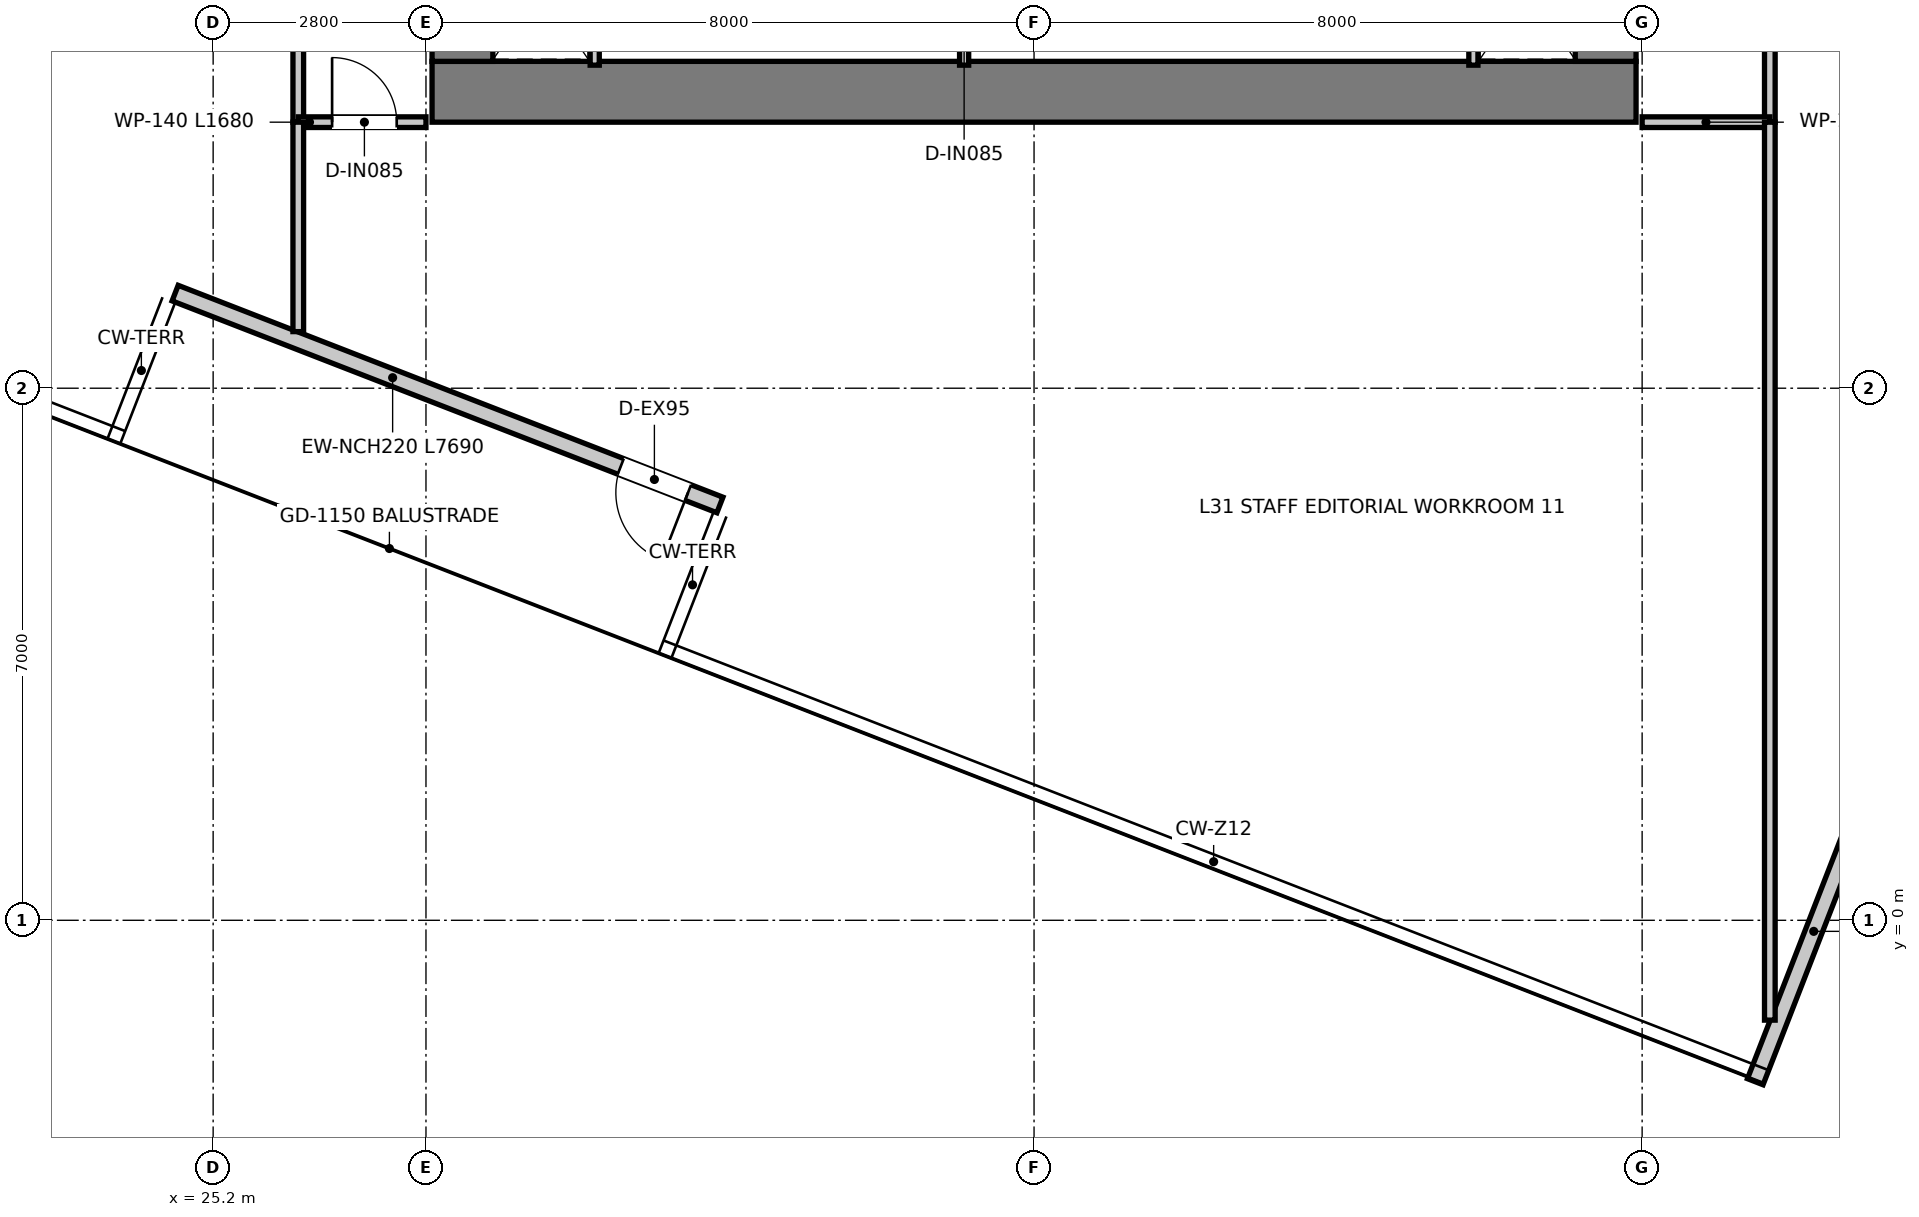
"""IFC4 building model, lengths in metres.
Left out: names, types, materials, properties, quantities, classifications, styles, units other than length and angle.
Written with IfcOpenShell. Run it as: python <this file> out.ifc"""

import sys

from ifc_helpers import new_model, si_unit, direction, frame, frame_2d, origin, place, context, subcontext, project, spatial, rectangle, extrude, element, fill, save


model = new_model("IFC4")
c1 = context("Model", 3, precision=1e-05, world=origin(), true_north=direction((0.0, 1.0)))
c2 = subcontext(c1, "Body", "Model", "MODEL_VIEW")
j1 = project(units=[si_unit("LENGTHUNIT", "METRE"), si_unit("PLANEANGLEUNIT", "RADIAN")], contexts=[c1])
p1 = place(None, origin())
s1 = spatial("IfcSite", under=j1, at=p1, CompositionType="ELEMENT")
p2 = place(p1, origin())
s2 = spatial("IfcBuilding", under=s1, at=p2, CompositionType="ELEMENT")
p3 = place(p2, frame((0.0, 0.0, 129.55)))
s3 = spatial("IfcBuildingStorey", under=s2, at=p3, CompositionType="ELEMENT", Elevation=129.55)
p4 = place(p3, frame((28.08, 10.9, 0.0), z_axis=(0.0, 0.0, 1.0), x_axis=(1.0, 0.0, 0.0)))
e1 = element("IfcWall", 1, at=p4, inside=s3, PredefinedType="SHEAR", context=c2, shape_type="SweptSolid", body=[
    extrude(rectangle(XDim=15.84, YDim=0.8, at=frame_2d((7.92, 0.0))), origin(), (0.0, 0.0, 1.0), 3.95),
])
for number, where, z_axis, x_axis in (
    (2, (28.48, 11.3, 0.0), (0.0, 0.0, 1.0), (0.0, 1.0, 0.0)),
    (3, (43.52, 11.3, 0.0), (0.0, 0.0, 1.0), (0.0, 1.0, 0.0)),
):
    element("IfcWall", number, at=place(p3, frame(where, z_axis=z_axis, x_axis=x_axis)), inside=s3, PredefinedType="SHEAR", context=c2, shape_type="SweptSolid", body=[
        extrude(rectangle(XDim=14.7, YDim=0.8, at=frame_2d((7.35, 0.0))), origin(), (0.0, 0.0, 1.0), 3.95),
    ])
p5 = place(p3, frame((31.867, 5.464, 0.0), z_axis=(0.0, 0.0, 1.0), x_axis=(-0.931996329979, 0.362467710157, 0.0)))
e4 = element("IfcWall", 4, at=p5, inside=s3, PredefinedType="ELEMENTEDWALL", context=c2, shape_type="SweptSolid", body=[
    extrude(rectangle(XDim=7.69, YDim=0.22, at=frame_2d((3.845, 0.0))), origin(), (0.0, 0.0, 1.0), 3.67),
])
p6 = place(p5, frame((0.45, 0.0, 0.0)))
e5 = element("IfcOpeningElement", 5, at=p6, cuts=e4, PredefinedType="OPENING", context=c2, shape_type="SweptSolid", body=[
    extrude(rectangle(XDim=0.95, YDim=2.1, at=frame_2d((0.475, 1.05))), frame((0.0, 0.12, 0.0), z_axis=(0.0, -1.0, 0.0), x_axis=(1.0, 0.0, 0.0)), (0.0, 0.0, 1.0), 0.24),
])
p7 = place(p3, frame((45.488, -2.124, 0.0), z_axis=(0.0, 0.0, 1.0), x_axis=(0.362429609335, 0.932011147078, 0.0)))
e6 = element("IfcWall", 6, at=p7, inside=s3, PredefinedType="ELEMENTEDWALL", context=c2, shape_type="SweptSolid", body=[
    extrude(rectangle(XDim=4.245, YDim=0.22, at=frame_2d((2.123, 0.0))), origin(), (0.0, 0.0, 1.0), 3.67),
])
for number, where, z_axis, x_axis in (
    (7, (30.22, 11.25, 0.0), (0.0, 0.0, 1.0), (0.0, 1.0, 0.0)),
    (8, (41.78, 11.25, 0.0), (0.0, 0.0, 1.0), (0.0, 1.0, 0.0)),
):
    element("IfcWall", number, at=place(p3, frame(where, z_axis=z_axis, x_axis=x_axis)), inside=s3, PredefinedType="PARTITIONING", context=c2, shape_type="SweptSolid", body=[
        extrude(rectangle(XDim=1.97, YDim=0.12, at=frame_2d((0.985, 0.0))), origin(), (0.0, 0.0, 1.0), 3.67),
    ])
p8 = place(p3, frame((35.08, 11.25, 0.0), z_axis=(0.0, 0.0, 1.0), x_axis=(0.0, 1.0, 0.0)))
e9 = element("IfcWall", 9, at=p8, inside=s3, PredefinedType="PARTITIONING", context=c2, shape_type="SweptSolid", body=[
    extrude(rectangle(XDim=1.97, YDim=0.12, at=frame_2d((0.985, 0.0))), origin(), (0.0, 0.0, 1.0), 3.67),
])
p9 = place(p8, frame((0.545, 0.0, 0.0)))
e10 = element("IfcOpeningElement", 10, at=p9, cuts=e9, PredefinedType="OPENING", context=c2, shape_type="SweptSolid", body=[
    extrude(rectangle(XDim=0.85, YDim=2.1, at=frame_2d((0.425, 1.05))), frame((0.0, 0.07, 0.0), z_axis=(0.0, -1.0, 0.0), x_axis=(1.0, 0.0, 0.0)), (0.0, 0.0, 1.0), 0.14),
])
p10 = place(p3, frame((26.32, 10.5, 0.0), z_axis=(0.0, 0.0, 1.0), x_axis=(0.0, 1.0, 0.0)))
e11 = element("IfcWall", 11, at=p10, inside=s3, PredefinedType="PARTITIONING", context=c2, shape_type="SweptSolid", body=[
    extrude(rectangle(XDim=25.62, YDim=0.14, at=frame_2d((12.81, 0.0))), origin(), (0.0, 0.0, 1.0), 2.97),
])
p11 = place(p10, frame((9.525, 0.0, 0.0)))
e12 = element("IfcOpeningElement", 12, at=p11, cuts=e11, PredefinedType="OPENING", context=c2, shape_type="SweptSolid", body=[
    extrude(rectangle(XDim=0.95, YDim=2.1, at=frame_2d((0.475, 1.05))), frame((0.0, 0.08, 0.0), z_axis=(0.0, -1.0, 0.0), x_axis=(1.0, 0.0, 0.0)), (0.0, 0.0, 1.0), 0.16),
])
p12 = place(p10, frame((16.525, 0.0, 0.0)))
e13 = element("IfcOpeningElement", 13, at=p12, cuts=e11, PredefinedType="OPENING", context=c2, shape_type="SweptSolid", body=[
    extrude(rectangle(XDim=0.95, YDim=2.1, at=frame_2d((0.475, 1.05))), frame((0.0, 0.08, 0.0), z_axis=(0.0, -1.0, 0.0), x_axis=(1.0, 0.0, 0.0)), (0.0, 0.0, 1.0), 0.16),
])
p13 = place(p10, frame((22.125, 0.0, 0.0)))
e14 = element("IfcOpeningElement", 14, at=p13, cuts=e11, PredefinedType="OPENING", context=c2, shape_type="SweptSolid", body=[
    extrude(rectangle(XDim=0.95, YDim=2.1, at=frame_2d((0.475, 1.05))), frame((0.0, 0.08, 0.0), z_axis=(0.0, -1.0, 0.0), x_axis=(1.0, 0.0, 0.0)), (0.0, 0.0, 1.0), 0.16),
])
p14 = place(p3, frame((45.68, 10.5, 0.0), z_axis=(0.0, 0.0, 1.0), x_axis=(0.0, 1.0, 0.0)))
e15 = element("IfcWall", 15, at=p14, inside=s3, PredefinedType="PARTITIONING", context=c2, shape_type="SweptSolid", body=[
    extrude(rectangle(XDim=25.62, YDim=0.14, at=frame_2d((12.81, 0.0))), origin(), (0.0, 0.0, 1.0), 2.97),
])
p15 = place(p14, frame((7.775, 0.0, 0.0)))
e16 = element("IfcOpeningElement", 16, at=p15, cuts=e15, PredefinedType="OPENING", context=c2, shape_type="SweptSolid", body=[
    extrude(rectangle(XDim=0.95, YDim=2.1, at=frame_2d((0.475, 1.05))), frame((0.0, 0.08, 0.0), z_axis=(0.0, -1.0, 0.0), x_axis=(1.0, 0.0, 0.0)), (0.0, 0.0, 1.0), 0.16),
])
p16 = place(p14, frame((11.775, 0.0, 0.0)))
e17 = element("IfcOpeningElement", 17, at=p16, cuts=e15, PredefinedType="OPENING", context=c2, shape_type="SweptSolid", body=[
    extrude(rectangle(XDim=0.95, YDim=2.1, at=frame_2d((0.475, 1.05))), frame((0.0, 0.08, 0.0), z_axis=(0.0, -1.0, 0.0), x_axis=(1.0, 0.0, 0.0)), (0.0, 0.0, 1.0), 0.16),
])
p17 = place(p14, frame((17.275, 0.0, 0.0)))
e18 = element("IfcOpeningElement", 18, at=p17, cuts=e15, PredefinedType="OPENING", context=c2, shape_type="SweptSolid", body=[
    extrude(rectangle(XDim=0.95, YDim=2.1, at=frame_2d((0.475, 1.05))), frame((0.0, 0.08, 0.0), z_axis=(0.0, -1.0, 0.0), x_axis=(1.0, 0.0, 0.0)), (0.0, 0.0, 1.0), 0.16),
])
p18 = place(p14, frame((21.875, 0.0, 0.0)))
e19 = element("IfcOpeningElement", 19, at=p18, cuts=e15, PredefinedType="OPENING", context=c2, shape_type="SweptSolid", body=[
    extrude(rectangle(XDim=0.95, YDim=2.1, at=frame_2d((0.475, 1.05))), frame((0.0, 0.08, 0.0), z_axis=(0.0, -1.0, 0.0), x_axis=(1.0, 0.0, 0.0)), (0.0, 0.0, 1.0), 0.16),
])
p19 = place(p3, frame((26.32, 10.5, 0.0), z_axis=(0.0, 0.0, 1.0), x_axis=(1.0, 0.0, 0.0)))
e20 = element("IfcWall", 20, at=p19, inside=s3, PredefinedType="PARTITIONING", context=c2, shape_type="SweptSolid", body=[
    extrude(rectangle(XDim=1.68, YDim=0.14, at=frame_2d((0.84, 0.0))), origin(), (0.0, 0.0, 1.0), 3.67),
])
p20 = place(p19, frame((0.445, 0.0, 0.0)))
e21 = element("IfcOpeningElement", 21, at=p20, cuts=e20, PredefinedType="OPENING", context=c2, shape_type="SweptSolid", body=[
    extrude(rectangle(XDim=0.85, YDim=2.1, at=frame_2d((0.425, 1.05))), frame((0.0, 0.08, 0.0), z_axis=(0.0, -1.0, 0.0), x_axis=(1.0, 0.0, 0.0)), (0.0, 0.0, 1.0), 0.16),
])
p21 = place(p3, frame((44.0, 10.5, 0.0), z_axis=(0.0, 0.0, 1.0), x_axis=(1.0, 0.0, 0.0)))
e22 = element("IfcWall", 22, at=p21, inside=s3, PredefinedType="PARTITIONING", context=c2, shape_type="SweptSolid", body=[
    extrude(rectangle(XDim=1.68, YDim=0.14, at=frame_2d((0.84, 0.0))), origin(), (0.0, 0.0, 1.0), 3.67),
])
p22 = place(p3, frame((26.32, 7.745, 0.0), z_axis=(0.0, 0.0, 1.0), x_axis=(0.0, 1.0, 0.0)))
e23 = element("IfcWall", 23, at=p22, inside=s3, PredefinedType="PARTITIONING", context=c2, shape_type="SweptSolid", body=[
    extrude(rectangle(XDim=2.755, YDim=0.14, at=frame_2d((1.378, 0.0))), origin(), (0.0, 0.0, 1.0), 3.67),
])
p23 = place(p3, frame((45.68, -1.313, 0.0), z_axis=(0.0, 0.0, 1.0), x_axis=(0.0, 1.0, 0.0)))
e24 = element("IfcWall", 24, at=p23, inside=s3, PredefinedType="PARTITIONING", context=c2, shape_type="SweptSolid", body=[
    extrude(rectangle(XDim=11.813, YDim=0.14, at=frame_2d((5.907, 0.0))), origin(), (0.0, 0.0, 1.0), 3.67),
])
p24 = place(p20, origin())
e25 = element("IfcDoor", 25, at=p24, inside=s3, OperationType="SINGLE_SWING_LEFT", PredefinedType="DOOR", context=c2, shape_type="SweptSolid", body=[
    extrude(rectangle(XDim=0.85, YDim=2.1, at=frame_2d((0.425, 1.05))), frame((0.0, 0.025, 0.0), z_axis=(0.0, -1.0, 0.0), x_axis=(1.0, 0.0, 0.0)), (0.0, 0.0, 1.0), 0.05),
])
fill(e21, e25)
p25 = place(p6, origin())
e26 = element("IfcDoor", 26, at=p25, inside=s3, OperationType="SINGLE_SWING_LEFT", PredefinedType="DOOR", context=c2, shape_type="SweptSolid", body=[
    extrude(rectangle(XDim=0.95, YDim=2.1, at=frame_2d((0.475, 1.05))), frame((0.0, 0.025, 0.0), z_axis=(0.0, -1.0, 0.0), x_axis=(1.0, 0.0, 0.0)), (0.0, 0.0, 1.0), 0.05),
])
fill(e5, e26)
save(model, sys.argv[1])
